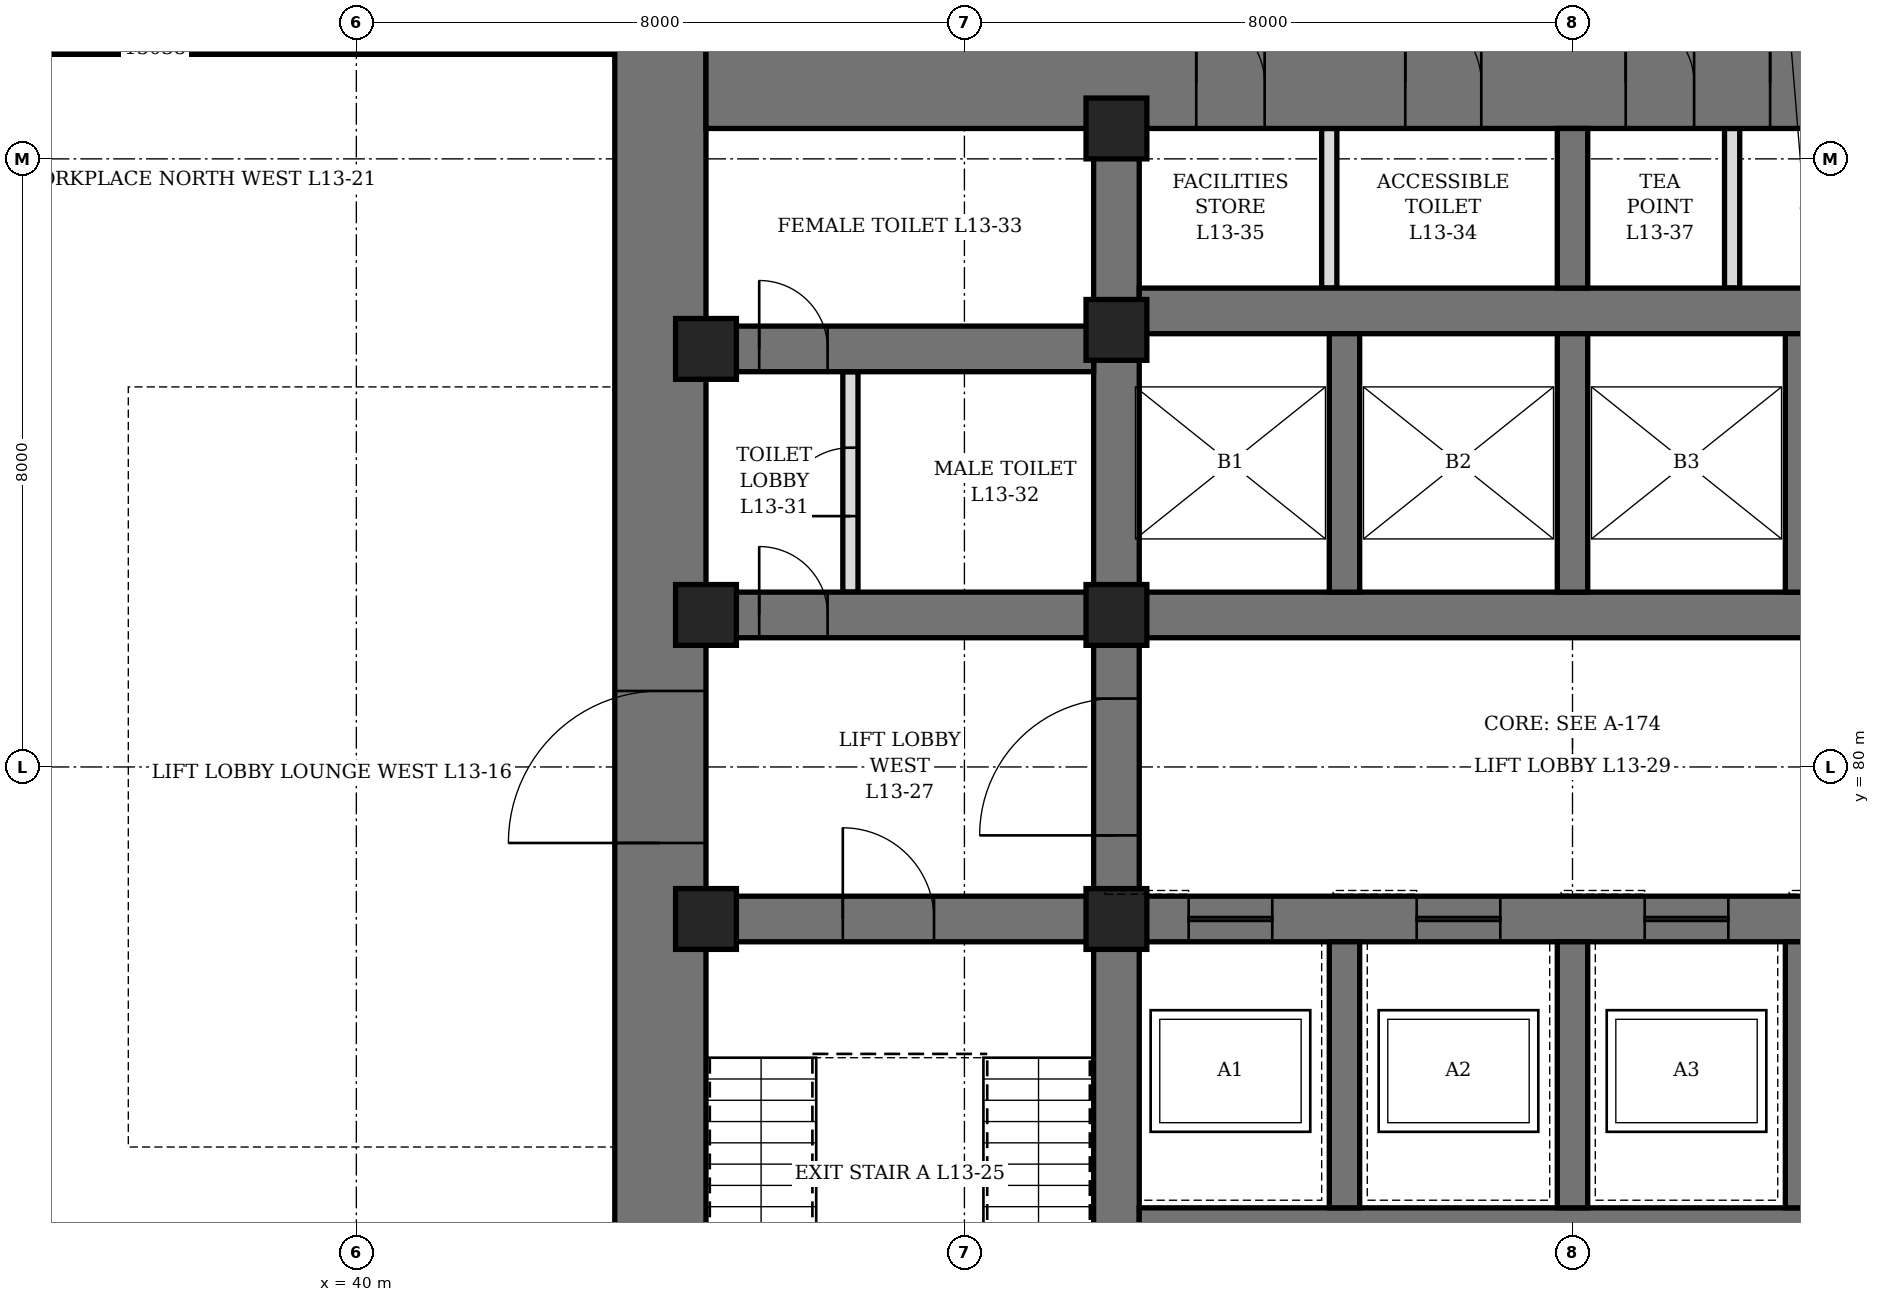
"""IFC4 building model, lengths in metres.
Left out: names, types, materials, properties, quantities, classifications, styles, units other than length and angle.
Written with IfcOpenShell. Run it as: python <this file> out.ifc"""

import sys

from ifc_helpers import new_model, si_unit, direction, frame, frame_2d, origin, origin_2d, place, context, subcontext, project, spatial, rectangle, hollow_rectangle, extrude, element, fill, save


model = new_model("IFC4")
c1 = context("Model", 3, precision=1e-05, world=origin(), true_north=direction((0.0, 1.0)))
c2 = subcontext(c1, "Body", "Model", "MODEL_VIEW")
j1 = project(units=[si_unit("LENGTHUNIT", "METRE"), si_unit("PLANEANGLEUNIT", "RADIAN")], contexts=[c1])
p1 = place(None, origin())
s1 = spatial("IfcSite", under=j1, at=p1, CompositionType="ELEMENT")
p2 = place(p1, origin())
s2 = spatial("IfcBuilding", under=s1, at=p2, CompositionType="ELEMENT")
p3 = place(p2, frame((0.0, 0.0, 64.3)))
s3 = spatial("IfcBuildingStorey", under=s2, at=p3, CompositionType="ELEMENT", Elevation=64.3)
p4 = place(p3, frame((44.0, 70.4, 0.0), z_axis=(0.0, 0.0, 1.0), x_axis=(0.0, 1.0, 0.0)))
e1 = element("IfcWall", 1, at=p4, inside=s3, PredefinedType="SHEAR", context=c2, shape_type="SweptSolid", body=[
    extrude(rectangle(XDim=19.2, YDim=1.2, at=frame_2d((9.6, 0.0))), origin(), (0.0, 0.0, 1.0), 4.2),
])
p5 = place(p4, frame((8.6, 0.0, 0.0)))
e2 = element("IfcOpeningElement", 2, at=p5, cuts=e1, PredefinedType="OPENING", context=c2, shape_type="SweptSolid", body=[
    extrude(rectangle(XDim=2.0, YDim=2.4, at=frame_2d((1.0, 1.2))), frame((0.0, 0.61, 0.0), z_axis=(0.0, -1.0, 0.0), x_axis=(1.0, 0.0, 0.0)), (0.0, 0.0, 1.0), 1.22),
])
p6 = place(p3, frame((44.6, 89.0, 0.0), z_axis=(0.0, 0.0, 1.0), x_axis=(1.0, 0.0, 0.0)))
e3 = element("IfcWall", 3, at=p6, inside=s3, PredefinedType="SHEAR", context=c2, shape_type="SweptSolid", body=[
    extrude(rectangle(XDim=22.8, YDim=1.2, at=frame_2d((11.4, 0.0))), origin(), (0.0, 0.0, 1.0), 4.2),
])
p7 = place(p6, frame((9.2, 0.0, 0.0)))
e4 = element("IfcOpeningElement", 4, at=p7, cuts=e3, PredefinedType="OPENING", context=c2, shape_type="SweptSolid", body=[
    extrude(rectangle(XDim=1.0, YDim=2.1, at=frame_2d((0.5, 1.05))), frame((0.0, 0.61, 0.0), z_axis=(0.0, -1.0, 0.0), x_axis=(1.0, 0.0, 0.0)), (0.0, 0.0, 1.0), 1.22),
])
p8 = place(p6, frame((6.45, 0.0, 0.0)))
e5 = element("IfcOpeningElement", 5, at=p8, cuts=e3, PredefinedType="OPENING", context=c2, shape_type="SweptSolid", body=[
    extrude(rectangle(XDim=0.9, YDim=2.1, at=frame_2d((0.45, 1.05))), frame((0.0, 0.61, 0.0), z_axis=(0.0, -1.0, 0.0), x_axis=(1.0, 0.0, 0.0)), (0.0, 0.0, 1.0), 1.22),
])
p9 = place(p6, frame((12.1, 0.0, 0.0)))
e6 = element("IfcOpeningElement", 6, at=p9, cuts=e3, PredefinedType="OPENING", context=c2, shape_type="SweptSolid", body=[
    extrude(rectangle(XDim=0.9, YDim=2.1, at=frame_2d((0.45, 1.05))), frame((0.0, 0.61, 0.0), z_axis=(0.0, -1.0, 0.0), x_axis=(1.0, 0.0, 0.0)), (0.0, 0.0, 1.0), 1.22),
])
p10 = place(p6, frame((14.0, 0.0, 0.0)))
e7 = element("IfcOpeningElement", 7, at=p10, cuts=e3, PredefinedType="OPENING", context=c2, shape_type="SweptSolid", body=[
    extrude(rectangle(XDim=0.9, YDim=2.1, at=frame_2d((0.45, 1.05))), frame((0.0, 0.61, 0.0), z_axis=(0.0, -1.0, 0.0), x_axis=(1.0, 0.0, 0.0)), (0.0, 0.0, 1.0), 1.22),
])
p11 = place(p3, frame((50.0, 71.6, 0.0), z_axis=(0.0, 0.0, 1.0), x_axis=(0.0, 1.0, 0.0)))
e8 = element("IfcWall", 8, at=p11, inside=s3, PredefinedType="SHEAR", context=c2, shape_type="SweptSolid", body=[
    extrude(rectangle(XDim=16.8, YDim=0.6, at=frame_2d((8.4, 0.0))), origin(), (0.0, 0.0, 1.0), 4.2),
])
p12 = place(p11, frame((7.5, 0.0, 0.0)))
e9 = element("IfcOpeningElement", 9, at=p12, cuts=e8, PredefinedType="OPENING", context=c2, shape_type="SweptSolid", body=[
    extrude(rectangle(XDim=1.8, YDim=2.4, at=frame_2d((0.9, 1.2))), frame((0.0, 0.31, 0.0), z_axis=(0.0, -1.0, 0.0), x_axis=(1.0, 0.0, 0.0)), (0.0, 0.0, 1.0), 0.62),
])
p13 = place(p3, frame((44.6, 78.0, 0.0), z_axis=(0.0, 0.0, 1.0), x_axis=(1.0, 0.0, 0.0)))
e10 = element("IfcWall", 10, at=p13, inside=s3, PredefinedType="SHEAR", context=c2, shape_type="SweptSolid", body=[
    extrude(rectangle(XDim=5.1, YDim=0.6, at=frame_2d((2.55, 0.0))), origin(), (0.0, 0.0, 1.0), 4.2),
])
p14 = place(p13, frame((1.8, 0.0, 0.0)))
e11 = element("IfcOpeningElement", 11, at=p14, cuts=e10, PredefinedType="OPENING", context=c2, shape_type="SweptSolid", body=[
    extrude(rectangle(XDim=1.2, YDim=2.1, at=frame_2d((0.6, 1.05))), frame((0.0, 0.31, 0.0), z_axis=(0.0, -1.0, 0.0), x_axis=(1.0, 0.0, 0.0)), (0.0, 0.0, 1.0), 0.62),
])
p15 = place(p3, frame((44.6, 82.0, 0.0), z_axis=(0.0, 0.0, 1.0), x_axis=(1.0, 0.0, 0.0)))
e12 = element("IfcWall", 12, at=p15, inside=s3, PredefinedType="SHEAR", context=c2, shape_type="SweptSolid", body=[
    extrude(rectangle(XDim=5.1, YDim=0.6, at=frame_2d((2.55, 0.0))), origin(), (0.0, 0.0, 1.0), 4.2),
])
p16 = place(p15, frame((0.7, 0.0, 0.0)))
e13 = element("IfcOpeningElement", 13, at=p16, cuts=e12, PredefinedType="OPENING", context=c2, shape_type="SweptSolid", body=[
    extrude(rectangle(XDim=0.9, YDim=2.1, at=frame_2d((0.45, 1.05))), frame((0.0, 0.31, 0.0), z_axis=(0.0, -1.0, 0.0), x_axis=(1.0, 0.0, 0.0)), (0.0, 0.0, 1.0), 0.62),
])
p17 = place(p3, frame((44.6, 85.5, 0.0), z_axis=(0.0, 0.0, 1.0), x_axis=(1.0, 0.0, 0.0)))
e14 = element("IfcWall", 14, at=p17, inside=s3, PredefinedType="SHEAR", context=c2, shape_type="SweptSolid", body=[
    extrude(rectangle(XDim=5.1, YDim=0.6, at=frame_2d((2.55, 0.0))), origin(), (0.0, 0.0, 1.0), 4.2),
])
p18 = place(p17, frame((0.7, 0.0, 0.0)))
e15 = element("IfcOpeningElement", 15, at=p18, cuts=e14, PredefinedType="OPENING", context=c2, shape_type="SweptSolid", body=[
    extrude(rectangle(XDim=0.9, YDim=2.1, at=frame_2d((0.45, 1.05))), frame((0.0, 0.31, 0.0), z_axis=(0.0, -1.0, 0.0), x_axis=(1.0, 0.0, 0.0)), (0.0, 0.0, 1.0), 0.62),
])
p19 = place(p3, frame((50.3, 78.0, 0.0), z_axis=(0.0, 0.0, 1.0), x_axis=(1.0, 0.0, 0.0)))
e16 = element("IfcWall", 16, at=p19, inside=s3, PredefinedType="SHEAR", context=c2, shape_type="SweptSolid", body=[
    extrude(rectangle(XDim=11.4, YDim=0.6, at=frame_2d((5.7, 0.0))), origin(), (0.0, 0.0, 1.0), 4.2),
])
p20 = place(p19, frame((0.65, 0.0, 0.0)))
e17 = element("IfcOpeningElement", 17, at=p20, cuts=e16, PredefinedType="OPENING", context=c2, shape_type="SweptSolid", body=[
    extrude(rectangle(XDim=1.1, YDim=2.2, at=frame_2d((0.55, 1.1))), frame((0.0, 0.31, 0.0), z_axis=(0.0, -1.0, 0.0), x_axis=(1.0, 0.0, 0.0)), (0.0, 0.0, 1.0), 0.62),
])
p21 = place(p19, frame((3.65, 0.0, 0.0)))
e18 = element("IfcOpeningElement", 18, at=p21, cuts=e16, PredefinedType="OPENING", context=c2, shape_type="SweptSolid", body=[
    extrude(rectangle(XDim=1.1, YDim=2.2, at=frame_2d((0.55, 1.1))), frame((0.0, 0.31, 0.0), z_axis=(0.0, -1.0, 0.0), x_axis=(1.0, 0.0, 0.0)), (0.0, 0.0, 1.0), 0.62),
])
p22 = place(p19, frame((6.65, 0.0, 0.0)))
e19 = element("IfcOpeningElement", 19, at=p22, cuts=e16, PredefinedType="OPENING", context=c2, shape_type="SweptSolid", body=[
    extrude(rectangle(XDim=1.1, YDim=2.2, at=frame_2d((0.55, 1.1))), frame((0.0, 0.31, 0.0), z_axis=(0.0, -1.0, 0.0), x_axis=(1.0, 0.0, 0.0)), (0.0, 0.0, 1.0), 0.62),
])
p23 = place(p19, frame((9.65, 0.0, 0.0)))
e20 = element("IfcOpeningElement", 20, at=p23, cuts=e16, PredefinedType="OPENING", context=c2, shape_type="SweptSolid", body=[
    extrude(rectangle(XDim=1.1, YDim=2.2, at=frame_2d((0.55, 1.1))), frame((0.0, 0.31, 0.0), z_axis=(0.0, -1.0, 0.0), x_axis=(1.0, 0.0, 0.0)), (0.0, 0.0, 1.0), 0.62),
])
for number, where, z_axis, x_axis in (
    (21, (50.3, 82.0, 0.0), (0.0, 0.0, 1.0), (1.0, 0.0, 0.0)),
    (22, (50.3, 86.0, 0.0), (0.0, 0.0, 1.0), (1.0, 0.0, 0.0)),
):
    element("IfcWall", number, at=place(p3, frame(where, z_axis=z_axis, x_axis=x_axis)), inside=s3, PredefinedType="SHEAR", context=c2, shape_type="SweptSolid", body=[
        extrude(rectangle(XDim=11.4, YDim=0.6, at=frame_2d((5.7, 0.0))), origin(), (0.0, 0.0, 1.0), 4.2),
    ])
p24 = place(p3, frame((50.3, 74.0, 0.0), z_axis=(0.0, 0.0, 1.0), x_axis=(1.0, 0.0, 0.0)))
e23 = element("IfcWall", 23, at=p24, inside=s3, PredefinedType="SHEAR", context=c2, shape_type="SweptSolid", body=[
    extrude(rectangle(XDim=11.4, YDim=0.4, at=frame_2d((5.7, 0.0))), origin(), (0.0, 0.0, 1.0), 4.2),
])
p25 = place(p3, frame((53.0, 74.2, 0.0), z_axis=(0.0, 0.0, 1.0), x_axis=(0.0, 1.0, 0.0)))
e24 = element("IfcWall", 24, at=p25, inside=s3, PredefinedType="SHEAR", context=c2, shape_type="SweptSolid", body=[
    extrude(rectangle(XDim=3.5, YDim=0.4, at=frame_2d((1.75, 0.0))), origin(), (0.0, 0.0, 1.0), 4.2),
])
p26 = place(p3, frame((53.0, 82.3, 0.0), z_axis=(0.0, 0.0, 1.0), x_axis=(0.0, 1.0, 0.0)))
e25 = element("IfcWall", 25, at=p26, inside=s3, PredefinedType="SHEAR", context=c2, shape_type="SweptSolid", body=[
    extrude(rectangle(XDim=3.4, YDim=0.4, at=frame_2d((1.7, 0.0))), origin(), (0.0, 0.0, 1.0), 4.2),
])
p27 = place(p3, frame((56.0, 74.2, 0.0), z_axis=(0.0, 0.0, 1.0), x_axis=(0.0, 1.0, 0.0)))
e26 = element("IfcWall", 26, at=p27, inside=s3, PredefinedType="SHEAR", context=c2, shape_type="SweptSolid", body=[
    extrude(rectangle(XDim=3.5, YDim=0.4, at=frame_2d((1.75, 0.0))), origin(), (0.0, 0.0, 1.0), 4.2),
])
p28 = place(p3, frame((56.0, 82.3, 0.0), z_axis=(0.0, 0.0, 1.0), x_axis=(0.0, 1.0, 0.0)))
e27 = element("IfcWall", 27, at=p28, inside=s3, PredefinedType="SHEAR", context=c2, shape_type="SweptSolid", body=[
    extrude(rectangle(XDim=3.4, YDim=0.4, at=frame_2d((1.7, 0.0))), origin(), (0.0, 0.0, 1.0), 4.2),
])
p29 = place(p3, frame((59.0, 74.2, 0.0), z_axis=(0.0, 0.0, 1.0), x_axis=(0.0, 1.0, 0.0)))
e28 = element("IfcWall", 28, at=p29, inside=s3, PredefinedType="SHEAR", context=c2, shape_type="SweptSolid", body=[
    extrude(rectangle(XDim=3.5, YDim=0.4, at=frame_2d((1.75, 0.0))), origin(), (0.0, 0.0, 1.0), 4.2),
])
p30 = place(p3, frame((59.0, 82.3, 0.0), z_axis=(0.0, 0.0, 1.0), x_axis=(0.0, 1.0, 0.0)))
e29 = element("IfcWall", 29, at=p30, inside=s3, PredefinedType="SHEAR", context=c2, shape_type="SweptSolid", body=[
    extrude(rectangle(XDim=3.4, YDim=0.4, at=frame_2d((1.7, 0.0))), origin(), (0.0, 0.0, 1.0), 4.2),
])
p31 = place(p3, frame((56.0, 86.3, 0.0), z_axis=(0.0, 0.0, 1.0), x_axis=(0.0, 1.0, 0.0)))
e30 = element("IfcWall", 30, at=p31, inside=s3, PredefinedType="SHEAR", context=c2, shape_type="SweptSolid", body=[
    extrude(rectangle(XDim=2.1, YDim=0.4, at=frame_2d((1.05, 0.0))), origin(), (0.0, 0.0, 1.0), 4.2),
])
for number, where, z_axis, x_axis in (
    (31, (44.6, 78.0, 0.0), (0.0, 0.0, 1.0), (1.0, 0.0, 0.0)),
    (32, (44.6, 82.0, 0.0), (0.0, 0.0, 1.0), (1.0, 0.0, 0.0)),
    (33, (44.6, 85.5, 0.0), (0.0, 0.0, 1.0), (1.0, 0.0, 0.0)),
    (34, (50.0, 78.0, 0.0), (0.0, 0.0, 1.0), (1.0, 0.0, 0.0)),
    (35, (50.0, 82.0, 0.0), (0.0, 0.0, 1.0), (1.0, 0.0, 0.0)),
    (36, (50.0, 85.75, 0.0), (0.0, 0.0, 1.0), (1.0, 0.0, 0.0)),
    (37, (50.0, 88.4, 0.0), (0.0, 0.0, 1.0), (1.0, 0.0, 0.0)),
):
    element("IfcColumn", number, at=place(p3, frame(where, z_axis=z_axis, x_axis=x_axis)), inside=s3, PredefinedType="COLUMN", context=c2, shape_type="SweptSolid", body=[
        extrude(hollow_rectangle(XDim=0.8, YDim=0.8, WallThickness=0.1, at=origin_2d()), origin(), (0.0, 0.0, 1.0), 4.2),
    ])
p32 = place(p3, frame((46.5, 82.3, 0.0), z_axis=(0.0, 0.0, 1.0), x_axis=(0.0, 1.0, 0.0)))
e38 = element("IfcWall", 38, at=p32, inside=s3, PredefinedType="PARTITIONING", context=c2, shape_type="SweptSolid", body=[
    extrude(rectangle(XDim=2.9, YDim=0.2, at=frame_2d((1.45, 0.0))), origin(), (0.0, 0.0, 1.0), 4.04),
])
p33 = place(p32, frame((1.0, 0.0, 0.0)))
e39 = element("IfcOpeningElement", 39, at=p33, cuts=e38, PredefinedType="OPENING", context=c2, shape_type="SweptSolid", body=[
    extrude(rectangle(XDim=0.9, YDim=2.1, at=frame_2d((0.45, 1.05))), frame((0.0, 0.11, 0.0), z_axis=(0.0, -1.0, 0.0), x_axis=(1.0, 0.0, 0.0)), (0.0, 0.0, 1.0), 0.22),
])
for number, where, z_axis, x_axis in (
    (40, (52.8, 86.3, 0.0), (0.0, 0.0, 1.0), (0.0, 1.0, 0.0)),
    (41, (58.1, 86.3, 0.0), (0.0, 0.0, 1.0), (0.0, 1.0, 0.0)),
):
    element("IfcWall", number, at=place(p3, frame(where, z_axis=z_axis, x_axis=x_axis)), inside=s3, PredefinedType="PARTITIONING", context=c2, shape_type="SweptSolid", body=[
        extrude(rectangle(XDim=2.1, YDim=0.2, at=frame_2d((1.05, 0.0))), origin(), (0.0, 0.0, 1.0), 4.04),
    ])
p34 = place(p3, frame((31.31, 89.45, 0.0), z_axis=(0.0, 0.0, 1.0), x_axis=(1.0, 0.0, 0.0)))
e42 = element("IfcWall", 42, at=p34, inside=s3, PredefinedType="PARTITIONING", context=c2, shape_type="SweptSolid", body=[
    extrude(rectangle(XDim=12.09, YDim=0.15, at=frame_2d((6.045, 0.0))), origin(), (0.0, 0.0, 1.0), 4.04),
])
p35 = place(p34, frame((5.545, 0.0, 0.0)))
e43 = element("IfcOpeningElement", 43, at=p35, cuts=e42, PredefinedType="OPENING", context=c2, shape_type="SweptSolid", body=[
    extrude(rectangle(XDim=1.0, YDim=2.4, at=frame_2d((0.5, 1.2))), frame((0.0, 0.085, 0.0), z_axis=(0.0, -1.0, 0.0), x_axis=(1.0, 0.0, 0.0)), (0.0, 0.0, 1.0), 0.17),
])
p36 = place(p16, origin())
e44 = element("IfcDoor", 44, at=p36, inside=s3, OperationType="SINGLE_SWING_LEFT", PredefinedType="DOOR", context=c2, shape_type="SweptSolid", body=[
    extrude(rectangle(XDim=0.9, YDim=2.1, at=frame_2d((0.45, 1.05))), frame((0.0, 0.3, 0.0), z_axis=(0.0, -1.0, 0.0), x_axis=(1.0, 0.0, 0.0)), (0.0, 0.0, 1.0), 0.6),
])
fill(e13, e44)
p37 = place(p33, origin())
e45 = element("IfcDoor", 45, at=p37, inside=s3, OperationType="SINGLE_SWING_RIGHT", PredefinedType="DOOR", context=c2, shape_type="SweptSolid", body=[
    extrude(rectangle(XDim=0.9, YDim=2.1, at=frame_2d((0.45, 1.05))), frame((0.0, 0.1, 0.0), z_axis=(0.0, -1.0, 0.0), x_axis=(1.0, 0.0, 0.0)), (0.0, 0.0, 1.0), 0.199),
])
fill(e39, e45)
p38 = place(p18, origin())
e46 = element("IfcDoor", 46, at=p38, inside=s3, OperationType="SINGLE_SWING_RIGHT", PredefinedType="DOOR", context=c2, shape_type="SweptSolid", body=[
    extrude(rectangle(XDim=0.9, YDim=2.1, at=frame_2d((0.45, 1.05))), frame((0.0, 0.3, 0.0), z_axis=(0.0, -1.0, 0.0), x_axis=(1.0, 0.0, 0.0)), (0.0, 0.0, 1.0), 0.6),
])
fill(e15, e46)
p39 = place(p7, origin())
e47 = element("IfcDoor", 47, at=p39, inside=s3, OperationType="SINGLE_SWING_LEFT", PredefinedType="DOOR", context=c2, shape_type="SweptSolid", body=[
    extrude(rectangle(XDim=1.0, YDim=2.1, at=frame_2d((0.5, 1.05))), frame((0.0, 0.35, 0.0), z_axis=(0.0, -1.0, 0.0), x_axis=(1.0, 0.0, 0.0)), (0.0, 0.0, 1.0), 0.7),
])
fill(e4, e47)
p40 = place(p8, origin())
e48 = element("IfcDoor", 48, at=p40, inside=s3, OperationType="SINGLE_SWING_LEFT", PredefinedType="DOOR", context=c2, shape_type="SweptSolid", body=[
    extrude(rectangle(XDim=0.9, YDim=2.1, at=frame_2d((0.45, 1.05))), frame((0.0, 0.35, 0.0), z_axis=(0.0, -1.0, 0.0), x_axis=(1.0, 0.0, 0.0)), (0.0, 0.0, 1.0), 0.7),
])
fill(e5, e48)
p41 = place(p9, origin())
e49 = element("IfcDoor", 49, at=p41, inside=s3, OperationType="SINGLE_SWING_LEFT", PredefinedType="DOOR", context=c2, shape_type="SweptSolid", body=[
    extrude(rectangle(XDim=0.9, YDim=2.1, at=frame_2d((0.45, 1.05))), frame((0.0, 0.35, 0.0), z_axis=(0.0, -1.0, 0.0), x_axis=(1.0, 0.0, 0.0)), (0.0, 0.0, 1.0), 0.7),
])
fill(e6, e49)
p42 = place(p10, origin())
e50 = element("IfcDoor", 50, at=p42, inside=s3, OperationType="SINGLE_SWING_LEFT", PredefinedType="DOOR", context=c2, shape_type="SweptSolid", body=[
    extrude(rectangle(XDim=0.9, YDim=2.1, at=frame_2d((0.45, 1.05))), frame((0.0, 0.35, 0.0), z_axis=(0.0, -1.0, 0.0), x_axis=(1.0, 0.0, 0.0)), (0.0, 0.0, 1.0), 0.7),
])
fill(e7, e50)
p43 = place(p14, origin())
e51 = element("IfcDoor", 51, at=p43, inside=s3, OperationType="SINGLE_SWING_LEFT", PredefinedType="DOOR", context=c2, shape_type="SweptSolid", body=[
    extrude(rectangle(XDim=1.2, YDim=2.1, at=frame_2d((0.6, 1.05))), frame((0.0, 0.3, 0.0), z_axis=(0.0, -1.0, 0.0), x_axis=(1.0, 0.0, 0.0)), (0.0, 0.0, 1.0), 0.6),
])
fill(e11, e51)
p44 = place(p5, origin())
e52 = element("IfcDoor", 52, at=p44, inside=s3, OperationType="DOUBLE_DOOR_SINGLE_SWING", PredefinedType="DOOR", context=c2, shape_type="SweptSolid", body=[
    extrude(rectangle(XDim=2.0, YDim=2.4, at=frame_2d((1.0, 1.2))), frame((0.0, 0.35, 0.0), z_axis=(0.0, -1.0, 0.0), x_axis=(1.0, 0.0, 0.0)), (0.0, 0.0, 1.0), 0.7),
])
fill(e2, e52)
p45 = place(p12, origin())
e53 = element("IfcDoor", 53, at=p45, inside=s3, OperationType="DOUBLE_DOOR_SINGLE_SWING", PredefinedType="DOOR", context=c2, shape_type="SweptSolid", body=[
    extrude(rectangle(XDim=1.8, YDim=2.4, at=frame_2d((0.9, 1.2))), frame((0.0, 0.3, 0.0), z_axis=(0.0, -1.0, 0.0), x_axis=(1.0, 0.0, 0.0)), (0.0, 0.0, 1.0), 0.6),
])
fill(e9, e53)
p46 = place(p20, origin())
e54 = element("IfcDoor", 54, at=p46, inside=s3, OperationType="SLIDING_TO_LEFT", PredefinedType="DOOR", context=c2, shape_type="SweptSolid", body=[
    extrude(rectangle(XDim=1.1, YDim=2.2, at=frame_2d((0.55, 1.1))), frame((0.0, 0.3, 0.0), z_axis=(0.0, -1.0, 0.0), x_axis=(1.0, 0.0, 0.0)), (0.0, 0.0, 1.0), 0.6),
])
fill(e17, e54)
p47 = place(p21, origin())
e55 = element("IfcDoor", 55, at=p47, inside=s3, OperationType="SLIDING_TO_LEFT", PredefinedType="DOOR", context=c2, shape_type="SweptSolid", body=[
    extrude(rectangle(XDim=1.1, YDim=2.2, at=frame_2d((0.55, 1.1))), frame((0.0, 0.3, 0.0), z_axis=(0.0, -1.0, 0.0), x_axis=(1.0, 0.0, 0.0)), (0.0, 0.0, 1.0), 0.6),
])
fill(e18, e55)
p48 = place(p22, origin())
e56 = element("IfcDoor", 56, at=p48, inside=s3, OperationType="SLIDING_TO_LEFT", PredefinedType="DOOR", context=c2, shape_type="SweptSolid", body=[
    extrude(rectangle(XDim=1.1, YDim=2.2, at=frame_2d((0.55, 1.1))), frame((0.0, 0.3, 0.0), z_axis=(0.0, -1.0, 0.0), x_axis=(1.0, 0.0, 0.0)), (0.0, 0.0, 1.0), 0.6),
])
fill(e19, e56)
p49 = place(p35, origin())
e57 = element("IfcDoor", 57, at=p49, inside=s3, OperationType="SINGLE_SWING_RIGHT", PredefinedType="DOOR", context=c2, shape_type="SweptSolid", body=[
    extrude(rectangle(XDim=1.0, YDim=2.4, at=frame_2d((0.5, 1.2))), frame((0.0, 0.075, 0.0), z_axis=(0.0, -1.0, 0.0), x_axis=(1.0, 0.0, 0.0)), (0.0, 0.0, 1.0), 0.149),
])
fill(e43, e57)
save(model, sys.argv[1])
